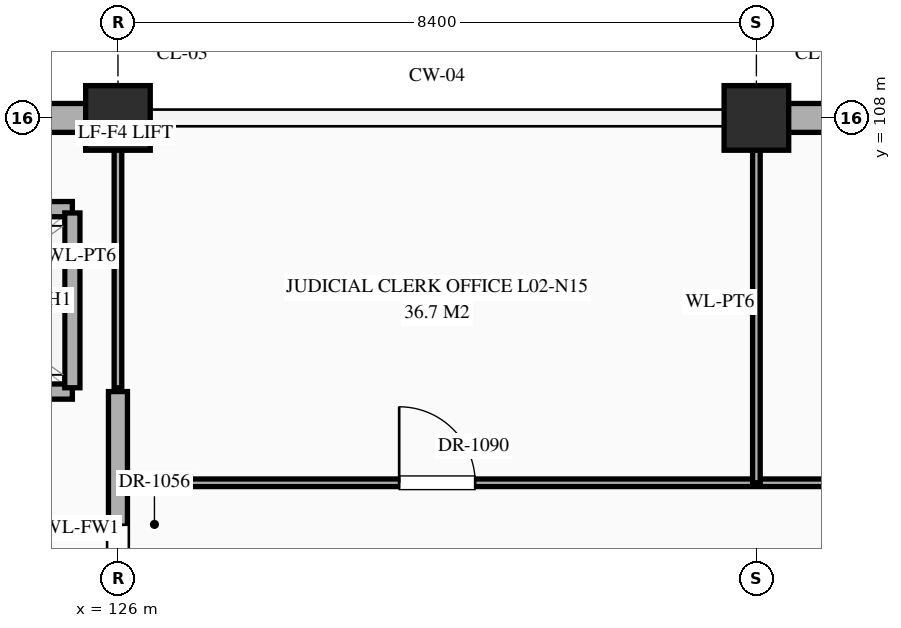
"""IFC4 building model, lengths in metres.
Left out: names, types, materials, properties, quantities, classifications, styles, units other than length and angle.
Written with IfcOpenShell. Run it as: python <this file> out.ifc"""

import sys

from ifc_helpers import new_model, si_unit, direction, frame, frame_2d, origin, origin_2d, place, context, subcontext, project, spatial, rectangle, extrude, element, fill, save


model = new_model("IFC4")
c1 = context("Model", 3, precision=1e-05, world=origin(), true_north=direction((0.0, 1.0)))
c2 = subcontext(c1, "Body", "Model", "MODEL_VIEW")
j1 = project(units=[si_unit("LENGTHUNIT", "METRE"), si_unit("PLANEANGLEUNIT", "RADIAN")], contexts=[c1])
p1 = place(None, origin())
s1 = spatial("IfcSite", under=j1, at=p1, CompositionType="ELEMENT")
p2 = place(p1, origin())
s2 = spatial("IfcBuilding", under=s1, at=p2, CompositionType="ELEMENT")
p3 = place(p2, frame((0.0, 0.0, 5.4)))
s3 = spatial("IfcBuildingStorey", under=s2, at=p3, CompositionType="ELEMENT", Elevation=5.4)
for number, where, z_axis, x_axis in (
    (1, (126.0, 108.0, 0.0), (0.0, 0.0, 1.0), (1.0, 0.0, 0.0)),
    (2, (134.4, 108.0, 0.0), (0.0, 0.0, 1.0), (1.0, 0.0, 0.0)),
):
    element("IfcColumn", number, at=place(p3, frame(where, z_axis=z_axis, x_axis=x_axis)), inside=s3, PredefinedType="COLUMN", context=c2, shape_type="SweptSolid", body=[
        extrude(rectangle(XDim=0.85, YDim=0.85, at=origin_2d()), origin(), (0.0, 0.0, 1.0), 5.4),
    ])
p4 = place(p3, frame((118.045, 108.0, 0.0), z_axis=(0.0, 0.0, 1.0), x_axis=(1.0, 0.0, 0.0)))
e3 = element("IfcWall", 3, at=p4, inside=s3, PredefinedType="STANDARD", context=c2, shape_type="SweptSolid", body=[
    extrude(rectangle(XDim=7.535, YDim=0.38, at=frame_2d((3.768, 0.0))), origin(), (0.0, 0.0, 1.0), 4.47),
])
p5 = place(p3, frame((134.82, 108.0, 0.0), z_axis=(0.0, 0.0, 1.0), x_axis=(1.0, 0.0, 0.0)))
e4 = element("IfcWall", 4, at=p5, inside=s3, PredefinedType="STANDARD", context=c2, shape_type="SweptSolid", body=[
    extrude(rectangle(XDim=7.56, YDim=0.38, at=frame_2d((3.78, 0.0))), origin(), (0.0, 0.0, 1.0), 4.47),
])
p6 = place(p5, frame((5.18, 0.0, 0.85)))
e5 = element("IfcOpeningElement", 5, at=p6, cuts=e4, PredefinedType="OPENING", context=c2, shape_type="SweptSolid", body=[
    extrude(rectangle(XDim=1.2, YDim=1.56, at=frame_2d((0.6, 0.78))), frame((0.0, 0.202, 0.0), z_axis=(0.0, -1.0, 0.0), x_axis=(1.0, 0.0, 0.0)), (0.0, 0.0, 1.0), 0.404),
])
p7 = place(p3, frame((126.0, 103.2, 0.0), z_axis=(0.0, 0.0, 1.0), x_axis=(1.0, 0.0, 0.0)))
e6 = element("IfcWall", 6, at=p7, inside=s3, PredefinedType="STANDARD", context=c2, shape_type="SweptSolid", body=[
    extrude(rectangle(XDim=41.96, YDim=0.1, at=frame_2d((20.98, 0.0))), origin(), (0.0, 0.0, 1.0), 5.12),
])
p8 = place(p7, frame((3.7, 0.0, 0.0)))
e7 = element("IfcOpeningElement", 7, at=p8, cuts=e6, PredefinedType="OPENING", context=c2, shape_type="SweptSolid", body=[
    extrude(rectangle(XDim=1.0, YDim=2.25, at=frame_2d((0.5, 1.125))), frame((0.0, 0.062, 0.0), z_axis=(0.0, -1.0, 0.0), x_axis=(1.0, 0.0, 0.0)), (0.0, 0.0, 1.0), 0.124),
])
p9 = place(p7, frame((12.08, 0.0, 0.0)))
e8 = element("IfcOpeningElement", 8, at=p9, cuts=e6, PredefinedType="OPENING", context=c2, shape_type="SweptSolid", body=[
    extrude(rectangle(XDim=1.04, YDim=2.2, at=frame_2d((0.52, 1.1))), frame((0.0, 0.062, 0.0), z_axis=(0.0, -1.0, 0.0), x_axis=(1.0, 0.0, 0.0)), (0.0, 0.0, 1.0), 0.124),
])
p10 = place(p7, frame((20.46, 0.0, 0.0)))
e9 = element("IfcOpeningElement", 9, at=p10, cuts=e6, PredefinedType="OPENING", context=c2, shape_type="SweptSolid", body=[
    extrude(rectangle(XDim=1.08, YDim=2.25, at=frame_2d((0.54, 1.125))), frame((0.0, 0.062, 0.0), z_axis=(0.0, -1.0, 0.0), x_axis=(1.0, 0.0, 0.0)), (0.0, 0.0, 1.0), 0.124),
])
p11 = place(p7, frame((28.84, 0.0, 0.0)))
e10 = element("IfcOpeningElement", 10, at=p11, cuts=e6, PredefinedType="OPENING", context=c2, shape_type="SweptSolid", body=[
    extrude(rectangle(XDim=1.12, YDim=2.25, at=frame_2d((0.56, 1.125))), frame((0.0, 0.062, 0.0), z_axis=(0.0, -1.0, 0.0), x_axis=(1.0, 0.0, 0.0)), (0.0, 0.0, 1.0), 0.124),
])
p12 = place(p7, frame((37.2, 0.0, 0.0)))
e11 = element("IfcOpeningElement", 11, at=p12, cuts=e6, PredefinedType="OPENING", context=c2, shape_type="SweptSolid", body=[
    extrude(rectangle(XDim=1.16, YDim=2.3, at=frame_2d((0.58, 1.15))), frame((0.0, 0.062, 0.0), z_axis=(0.0, -1.0, 0.0), x_axis=(1.0, 0.0, 0.0)), (0.0, 0.0, 1.0), 0.124),
])
p13 = place(p3, frame((122.4, 104.4, 0.0), z_axis=(0.0, 0.0, 1.0), x_axis=(1.0, 0.0, 0.0)))
e12 = element("IfcWall", 12, at=p13, inside=s3, PredefinedType="STANDARD", context=c2, shape_type="SweptSolid", body=[
    extrude(rectangle(XDim=3.0, YDim=0.2, at=frame_2d((1.5, 0.0))), origin(), (0.0, 0.0, 1.0), 5.12),
])
p14 = place(p13, frame((0.9, 0.0, 0.0)))
e13 = element("IfcOpeningElement", 13, at=p14, cuts=e12, PredefinedType="OPENING", context=c2, shape_type="SweptSolid", body=[
    extrude(rectangle(XDim=1.2, YDim=2.15, at=frame_2d((0.6, 1.075))), frame((0.0, 0.112, 0.0), z_axis=(0.0, -1.0, 0.0), x_axis=(1.0, 0.0, 0.0)), (0.0, 0.0, 1.0), 0.224),
])
p15 = place(p3, frame((122.4, 106.8, 0.0), z_axis=(0.0, 0.0, 1.0), x_axis=(1.0, 0.0, 0.0)))
e14 = element("IfcWall", 14, at=p15, inside=s3, PredefinedType="STANDARD", context=c2, shape_type="SweptSolid", body=[
    extrude(rectangle(XDim=3.0, YDim=0.2, at=frame_2d((1.5, 0.0))), origin(), (0.0, 0.0, 1.0), 5.12),
])
p16 = place(p3, frame((125.4, 104.45, 0.0), z_axis=(0.0, 0.0, 1.0), x_axis=(0.0, 1.0, 0.0)))
e15 = element("IfcWall", 15, at=p16, inside=s3, PredefinedType="STANDARD", context=c2, shape_type="SweptSolid", body=[
    extrude(rectangle(XDim=2.3, YDim=0.2, at=frame_2d((1.15, 0.0))), origin(), (0.0, 0.0, 1.0), 5.12),
])
p17 = place(p3, frame((126.0, 100.8, 0.0), z_axis=(0.0, 0.0, 1.0), x_axis=(0.0, 1.0, 0.0)))
e16 = element("IfcWall", 16, at=p17, inside=s3, PredefinedType="STANDARD", context=c2, shape_type="SweptSolid", body=[
    extrude(rectangle(XDim=3.6, YDim=0.25, at=frame_2d((1.8, 0.0))), origin(), (0.0, 0.0, 1.0), 4.37),
])
p18 = place(p17, frame((0.897, 0.0, 0.0)))
e17 = element("IfcOpeningElement", 17, at=p18, cuts=e16, PredefinedType="OPENING", context=c2, shape_type="SweptSolid", body=[
    extrude(rectangle(XDim=0.95, YDim=2.15, at=frame_2d((0.475, 1.075))), frame((0.0, 0.137, 0.0), z_axis=(0.0, -1.0, 0.0), x_axis=(1.0, 0.0, 0.0)), (0.0, 0.0, 1.0), 0.274),
])
p19 = place(p3, frame((126.0, 104.45, 0.0), z_axis=(0.0, 0.0, 1.0), x_axis=(0.0, 1.0, 0.0)))
e18 = element("IfcWall", 18, at=p19, inside=s3, PredefinedType="STANDARD", context=c2, shape_type="SweptSolid", body=[
    extrude(rectangle(XDim=3.46, YDim=0.1, at=frame_2d((1.73, 0.0))), origin(), (0.0, 0.0, 1.0), 4.37),
])
p20 = place(p3, frame((134.4, 103.2, 0.0), z_axis=(0.0, 0.0, 1.0), x_axis=(0.0, 1.0, 0.0)))
e19 = element("IfcWall", 19, at=p20, inside=s3, PredefinedType="STANDARD", context=c2, shape_type="SweptSolid", body=[
    extrude(rectangle(XDim=4.76, YDim=0.1, at=frame_2d((2.38, 0.0))), origin(), (0.0, 0.0, 1.0), 4.37),
])
p21 = place(p18, origin())
e20 = element("IfcDoor", 20, at=p21, inside=s3, OperationType="SINGLE_SWING_RIGHT", PredefinedType="DOOR", context=c2, shape_type="SweptSolid", body=[
    extrude(rectangle(XDim=0.95, YDim=2.15, at=frame_2d((0.475, 1.075))), frame((0.0, 0.025, 0.0), z_axis=(0.0, -1.0, 0.0), x_axis=(1.0, 0.0, 0.0)), (0.0, 0.0, 1.0), 0.05),
])
fill(e17, e20)
p22 = place(p8, origin())
e21 = element("IfcDoor", 21, at=p22, inside=s3, OperationType="SINGLE_SWING_LEFT", PredefinedType="DOOR", context=c2, shape_type="SweptSolid", body=[
    extrude(rectangle(XDim=1.0, YDim=2.25, at=frame_2d((0.5, 1.125))), frame((0.0, 0.025, 0.0), z_axis=(0.0, -1.0, 0.0), x_axis=(1.0, 0.0, 0.0)), (0.0, 0.0, 1.0), 0.05),
])
fill(e7, e21)
save(model, sys.argv[1])
